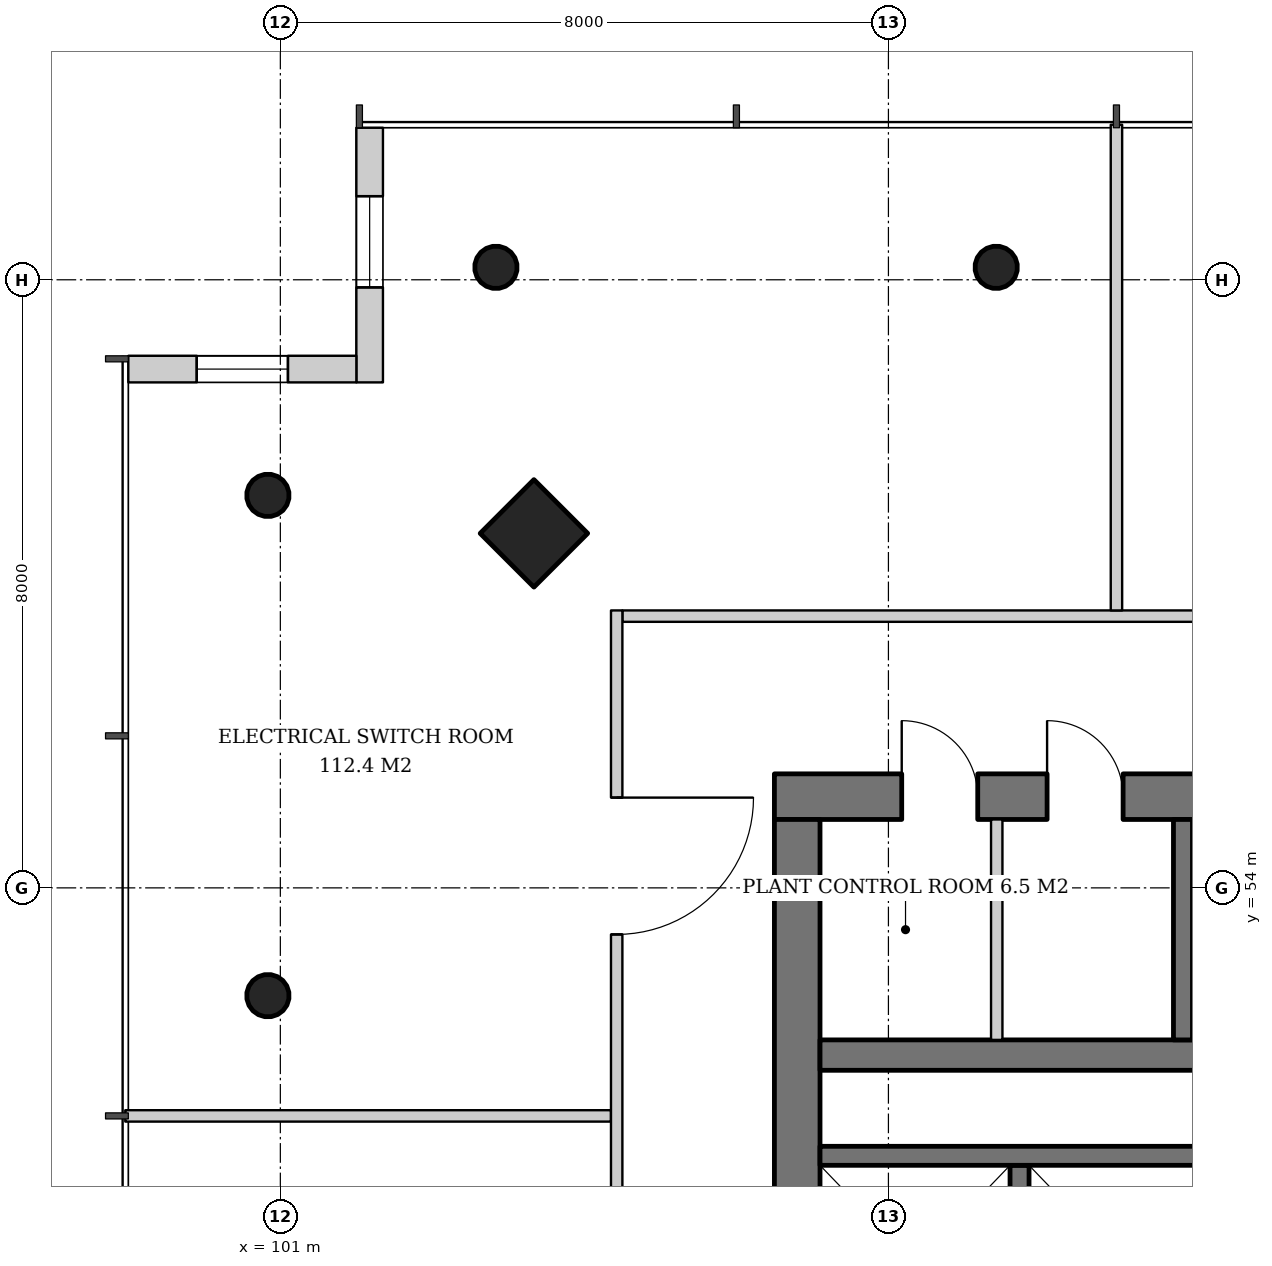
"""IFC4 building model, lengths in metres.
Left out: names, types, materials, properties, quantities, classifications, styles, units other than length and angle.
Written with IfcOpenShell. Run it as: python <this file> out.ifc"""

import sys

from ifc_helpers import new_model, si_unit, direction, frame, frame_2d, origin, origin_2d, place, context, subcontext, project, spatial, rectangle, hollow_circle, extrude, element, fill, save


model = new_model("IFC4")
c1 = context("Model", 3, precision=1e-05, world=origin(), true_north=direction((0.0, 1.0)))
c2 = subcontext(c1, "Body", "Model", "MODEL_VIEW")
j1 = project(units=[si_unit("LENGTHUNIT", "METRE"), si_unit("PLANEANGLEUNIT", "RADIAN")], contexts=[c1])
p1 = place(None, origin())
s1 = spatial("IfcSite", under=j1, at=p1, CompositionType="ELEMENT")
p2 = place(p1, origin())
s2 = spatial("IfcBuilding", under=s1, at=p2, CompositionType="ELEMENT")
p3 = place(p2, frame((0.0, 0.0, 85.6)))
s3 = spatial("IfcBuildingStorey", under=s2, at=p3, CompositionType="ELEMENT", Elevation=85.6)
p4 = place(p3, frame((104.284, 58.716, 0.0), z_axis=(0.043032401563, -0.043032401563, 0.998146494675), x_axis=(0.707106781187, 0.707106781187, 0.0)))
e1 = element("IfcColumn", 1, at=p4, inside=s3, PredefinedType="COLUMN", context=c2, shape_type="SweptSolid", body=[
    extrude(rectangle(XDim=1.0, YDim=1.0, at=origin_2d()), origin(), (0.0, 0.0, 1.0), 3.807),
])
p5 = place(p3, frame((103.784, 62.216, 0.0), z_axis=(0.043032401563, -0.043032401563, 0.998146494675), x_axis=(0.707106781187, 0.707106781187, 0.0)))
e2 = element("IfcColumn", 2, at=p5, inside=s3, PredefinedType="COLUMN", context=c2, shape_type="SweptSolid", body=[
    extrude(hollow_circle(Radius=0.28, WallThickness=0.02, at=origin_2d()), origin(), (0.0, 0.0, 1.0), 3.807),
])
p6 = place(p3, frame((110.392, 62.216, 0.0), z_axis=(0.02149908433, -0.04306234503, 0.998841040313), x_axis=(0.894693706707, 0.446680166538, 0.0)))
e3 = element("IfcColumn", 3, at=p6, inside=s3, PredefinedType="COLUMN", context=c2, shape_type="SweptSolid", body=[
    extrude(hollow_circle(Radius=0.28, WallThickness=0.02, at=origin_2d()), origin(), (0.0, 0.0, 1.0), 3.804),
])
p7 = place(p3, frame((100.784, 59.216, 0.0), z_axis=(0.043032401563, -0.043032401563, 0.998146494675), x_axis=(0.707106781187, 0.707106781187, 0.0)))
e4 = element("IfcColumn", 4, at=p7, inside=s3, PredefinedType="COLUMN", context=c2, shape_type="SweptSolid", body=[
    extrude(hollow_circle(Radius=0.28, WallThickness=0.02, at=origin_2d()), origin(), (0.0, 0.0, 1.0), 3.807),
])
p8 = place(p3, frame((100.784, 52.608, 0.0), z_axis=(0.04306234503, -0.02149908433, 0.998841040313), x_axis=(0.446680166538, 0.894693706707, 0.0)))
e5 = element("IfcColumn", 5, at=p8, inside=s3, PredefinedType="COLUMN", context=c2, shape_type="SweptSolid", body=[
    extrude(hollow_circle(Radius=0.28, WallThickness=0.02, at=origin_2d()), origin(), (0.0, 0.0, 1.0), 3.804),
])
p9 = place(p3, frame((107.5, 55.2, 0.0), z_axis=(0.0, 0.0, 1.0), x_axis=(1.0, 0.0, 0.0)))
e6 = element("IfcWall", 6, at=p9, inside=s3, PredefinedType="SHEAR", context=c2, shape_type="SweptSolid", body=[
    extrude(rectangle(XDim=19.0, YDim=0.6, at=frame_2d((9.5, 0.0))), origin(), (0.0, 0.0, 1.0), 3.8),
])
p10 = place(p9, frame((14.14, 0.0, 0.0)))
e7 = element("IfcOpeningElement", 7, at=p10, cuts=e6, PredefinedType="OPENING", context=c2, shape_type="SweptSolid", body=[
    extrude(rectangle(XDim=1.0, YDim=2.1, at=frame_2d((0.5, 1.05))), frame((0.0, 0.31, 0.0), z_axis=(0.0, -1.0, 0.0), x_axis=(1.0, 0.0, 0.0)), (0.0, 0.0, 1.0), 0.62),
])
p11 = place(p9, frame((1.675, 0.0, 0.0)))
e8 = element("IfcOpeningElement", 8, at=p11, cuts=e6, PredefinedType="OPENING", context=c2, shape_type="SweptSolid", body=[
    extrude(rectangle(XDim=1.0, YDim=2.1, at=frame_2d((0.5, 1.05))), frame((0.0, 0.31, 0.0), z_axis=(0.0, -1.0, 0.0), x_axis=(1.0, 0.0, 0.0)), (0.0, 0.0, 1.0), 0.62),
])
p12 = place(p9, frame((3.587, 0.0, 0.0)))
e9 = element("IfcOpeningElement", 9, at=p12, cuts=e6, PredefinedType="OPENING", context=c2, shape_type="SweptSolid", body=[
    extrude(rectangle(XDim=1.0, YDim=2.1, at=frame_2d((0.5, 1.05))), frame((0.0, 0.31, 0.0), z_axis=(0.0, -1.0, 0.0), x_axis=(1.0, 0.0, 0.0)), (0.0, 0.0, 1.0), 0.62),
])
p13 = place(p3, frame((107.8, 37.1, 0.0), z_axis=(0.0, 0.0, 1.0), x_axis=(0.0, 1.0, 0.0)))
e10 = element("IfcWall", 10, at=p13, inside=s3, PredefinedType="SHEAR", context=c2, shape_type="SweptSolid", body=[
    extrude(rectangle(XDim=17.8, YDim=0.6, at=frame_2d((8.9, 0.0))), origin(), (0.0, 0.0, 1.0), 3.8),
])
p14 = place(p13, frame((8.0, 0.0, 0.0)))
e11 = element("IfcOpeningElement", 11, at=p14, cuts=e10, PredefinedType="OPENING", context=c2, shape_type="SweptSolid", body=[
    extrude(rectangle(XDim=1.8, YDim=2.4, at=frame_2d((0.9, 1.2))), frame((0.0, 0.31, 0.0), z_axis=(0.0, -1.0, 0.0), x_axis=(1.0, 0.0, 0.0)), (0.0, 0.0, 1.0), 0.62),
])
p15 = place(p3, frame((108.1, 51.8, 0.0), z_axis=(0.0, 0.0, 1.0), x_axis=(1.0, 0.0, 0.0)))
e12 = element("IfcWall", 12, at=p15, inside=s3, PredefinedType="SHEAR", context=c2, shape_type="SweptSolid", body=[
    extrude(rectangle(XDim=17.8, YDim=0.4, at=frame_2d((8.9, 0.0))), origin(), (0.0, 0.0, 1.0), 3.8),
])
p16 = place(p15, frame((11.33, 0.0, 0.0)))
e13 = element("IfcOpeningElement", 13, at=p16, cuts=e12, PredefinedType="OPENING", context=c2, shape_type="SweptSolid", body=[
    extrude(rectangle(XDim=1.0, YDim=2.1, at=frame_2d((0.5, 1.05))), frame((0.0, 0.21, 0.0), z_axis=(0.0, -1.0, 0.0), x_axis=(1.0, 0.0, 0.0)), (0.0, 0.0, 1.0), 0.42),
])
p17 = place(p3, frame((102.175, 64.0, 0.0), z_axis=(0.0, 0.0, 1.0), x_axis=(0.0, -1.0, 0.0)))
e14 = element("IfcWall", 14, at=p17, inside=s3, PredefinedType="SOLIDWALL", context=c2, shape_type="SweptSolid", body=[
    extrude(rectangle(XDim=3.35, YDim=0.35, at=frame_2d((1.675, 0.0))), origin(), (0.0, 0.0, 1.0), 3.6),
])
p18 = place(p17, frame((0.9, 0.0, 0.6)))
e15 = element("IfcOpeningElement", 15, at=p18, cuts=e14, PredefinedType="OPENING", context=c2, shape_type="SweptSolid", body=[
    extrude(rectangle(XDim=1.2, YDim=2.55, at=frame_2d((0.6, 1.275))), frame((0.0, 0.185, 0.0), z_axis=(0.0, -1.0, 0.0), x_axis=(1.0, 0.0, 0.0)), (0.0, 0.0, 1.0), 0.37),
])
p19 = place(p3, frame((102.0, 60.825, 0.0), z_axis=(0.0, 0.0, 1.0), x_axis=(-1.0, 0.0, 0.0)))
e16 = element("IfcWall", 16, at=p19, inside=s3, PredefinedType="SOLIDWALL", context=c2, shape_type="SweptSolid", body=[
    extrude(rectangle(XDim=3.0, YDim=0.35, at=frame_2d((1.5, 0.0))), origin(), (0.0, 0.0, 1.0), 3.6),
])
p20 = place(p19, frame((0.9, 0.0, 0.6)))
e17 = element("IfcOpeningElement", 17, at=p20, cuts=e16, PredefinedType="OPENING", context=c2, shape_type="SweptSolid", body=[
    extrude(rectangle(XDim=1.2, YDim=2.55, at=frame_2d((0.6, 1.275))), frame((0.0, 0.185, 0.0), z_axis=(0.0, -1.0, 0.0), x_axis=(1.0, 0.0, 0.0)), (0.0, 0.0, 1.0), 0.37),
])
p21 = place(p3, frame((112.875, 52.0, 0.0), z_axis=(0.0, 0.0, 1.0), x_axis=(0.0, 1.0, 0.0)))
e18 = element("IfcWall", 18, at=p21, inside=s3, PredefinedType="SHEAR", context=c2, shape_type="SweptSolid", body=[
    extrude(rectangle(XDim=2.9, YDim=0.25, at=frame_2d((1.45, 0.0))), origin(), (0.0, 0.0, 1.0), 3.8),
])
p22 = place(p3, frame((110.725, 47.75, 0.0), z_axis=(0.0, 0.0, 1.0), x_axis=(0.0, 1.0, 0.0)))
e19 = element("IfcWall", 19, at=p22, inside=s3, PredefinedType="SHEAR", context=c2, shape_type="SweptSolid", body=[
    extrude(rectangle(XDim=2.6, YDim=0.25, at=frame_2d((1.3, 0.0))), origin(), (0.0, 0.0, 1.0), 3.8),
])
p23 = place(p3, frame((108.1, 50.475, 0.0), z_axis=(0.0, 0.0, 1.0), x_axis=(1.0, 0.0, 0.0)))
e20 = element("IfcWall", 20, at=p23, inside=s3, PredefinedType="SHEAR", context=c2, shape_type="SweptSolid", body=[
    extrude(rectangle(XDim=11.0, YDim=0.25, at=frame_2d((5.5, 0.0))), origin(), (0.0, 0.0, 1.0), 3.8),
])
p24 = place(p3, frame((110.425, 52.0, 0.0), z_axis=(0.0, 0.0, 1.0), x_axis=(0.0, 1.0, 0.0)))
e21 = element("IfcWall", 21, at=p24, inside=s3, PredefinedType="SOLIDWALL", context=c2, shape_type="SweptSolid", body=[
    extrude(rectangle(XDim=2.9, YDim=0.15, at=frame_2d((1.45, 0.0))), origin(), (0.0, 0.0, 1.0), 3.6),
])
p25 = place(p3, frame((128.65, 57.575, 0.0), z_axis=(0.0, 0.0, 1.0), x_axis=(-1.0, 0.0, 0.0)))
e22 = element("IfcWall", 22, at=p25, inside=s3, PredefinedType="SOLIDWALL", context=c2, shape_type="SweptSolid", body=[
    extrude(rectangle(XDim=23.15, YDim=0.15, at=frame_2d((11.575, 0.0))), origin(), (0.0, 0.0, 1.0), 2.9),
])
p26 = place(p25, frame((2.462, 0.0, 0.0)))
e23 = element("IfcOpeningElement", 23, at=p26, cuts=e22, PredefinedType="OPENING", context=c2, shape_type="SweptSolid", body=[
    extrude(rectangle(XDim=1.8, YDim=2.4, at=frame_2d((0.9, 1.2))), frame((0.0, 0.085, 0.0), z_axis=(0.0, -1.0, 0.0), x_axis=(1.0, 0.0, 0.0)), (0.0, 0.0, 1.0), 0.17),
])
p27 = place(p25, frame((10.75, 0.0, 0.0)))
e24 = element("IfcOpeningElement", 24, at=p27, cuts=e22, PredefinedType="OPENING", context=c2, shape_type="SweptSolid", body=[
    extrude(rectangle(XDim=1.8, YDim=2.4, at=frame_2d((0.9, 1.2))), frame((0.0, 0.085, 0.0), z_axis=(0.0, -1.0, 0.0), x_axis=(1.0, 0.0, 0.0)), (0.0, 0.0, 1.0), 0.17),
])
p28 = place(p3, frame((112.0, 57.65, 0.0), z_axis=(0.0, 0.0, 1.0), x_axis=(0.0, 1.0, 0.0)))
e25 = element("IfcWall", 25, at=p28, inside=s3, PredefinedType="SOLIDWALL", context=c2, shape_type="SweptSolid", body=[
    extrude(rectangle(XDim=6.39, YDim=0.15, at=frame_2d((3.195, 0.0))), origin(), (0.0, 0.0, 1.0), 3.2),
])
p29 = place(p3, frame((105.35, 51.0, 0.0), z_axis=(0.0, 0.0, 1.0), x_axis=(-1.0, 0.0, 0.0)))
e26 = element("IfcWall", 26, at=p29, inside=s3, PredefinedType="SOLIDWALL", context=c2, shape_type="SweptSolid", body=[
    extrude(rectangle(XDim=6.39, YDim=0.15, at=frame_2d((3.195, 0.0))), origin(), (0.0, 0.0, 1.0), 3.0),
])
p30 = place(p3, frame((105.425, 57.65, 0.0), z_axis=(0.0, 0.0, 1.0), x_axis=(0.0, -1.0, 0.0)))
e27 = element("IfcWall", 27, at=p30, inside=s3, PredefinedType="SOLIDWALL", context=c2, shape_type="SweptSolid", body=[
    extrude(rectangle(XDim=23.15, YDim=0.15, at=frame_2d((11.575, 0.0))), origin(), (0.0, 0.0, 1.0), 2.9),
])
p31 = place(p30, frame((2.462, 0.0, 0.0)))
e28 = element("IfcOpeningElement", 28, at=p31, cuts=e27, PredefinedType="OPENING", context=c2, shape_type="SweptSolid", body=[
    extrude(rectangle(XDim=1.8, YDim=2.4, at=frame_2d((0.9, 1.2))), frame((0.0, 0.085, 0.0), z_axis=(0.0, -1.0, 0.0), x_axis=(1.0, 0.0, 0.0)), (0.0, 0.0, 1.0), 0.17),
])
p32 = place(p30, frame((10.75, 0.0, 0.0)))
e29 = element("IfcOpeningElement", 29, at=p32, cuts=e27, PredefinedType="OPENING", context=c2, shape_type="SweptSolid", body=[
    extrude(rectangle(XDim=1.8, YDim=2.4, at=frame_2d((0.9, 1.2))), frame((0.0, 0.085, 0.0), z_axis=(0.0, -1.0, 0.0), x_axis=(1.0, 0.0, 0.0)), (0.0, 0.0, 1.0), 0.17),
])
p33 = place(p18, origin())
e30 = element("IfcWindow", 30, at=p33, inside=s3, PartitioningType="SINGLE_PANEL", PredefinedType="USERDEFINED", context=c2, shape_type="SweptSolid", body=[
    extrude(rectangle(XDim=1.2, YDim=2.55, at=frame_2d((0.6, 1.275))), frame((0.0, 0.03, 0.0), z_axis=(0.0, -1.0, 0.0), x_axis=(1.0, 0.0, 0.0)), (0.0, 0.0, 1.0), 0.06),
])
fill(e15, e30)
p34 = place(p20, origin())
e31 = element("IfcWindow", 31, at=p34, inside=s3, PartitioningType="SINGLE_PANEL", PredefinedType="USERDEFINED", context=c2, shape_type="SweptSolid", body=[
    extrude(rectangle(XDim=1.2, YDim=2.55, at=frame_2d((0.6, 1.275))), frame((0.0, 0.03, 0.0), z_axis=(0.0, -1.0, 0.0), x_axis=(1.0, 0.0, 0.0)), (0.0, 0.0, 1.0), 0.06),
])
fill(e17, e31)
p35 = place(p11, origin())
e32 = element("IfcDoor", 32, at=p35, inside=s3, OperationType="SINGLE_SWING_LEFT", PredefinedType="DOOR", context=c2, shape_type="SweptSolid", body=[
    extrude(rectangle(XDim=1.0, YDim=2.1, at=frame_2d((0.5, 1.05))), frame((0.0, -0.24, 0.0), z_axis=(0.0, -1.0, 0.0), x_axis=(1.0, 0.0, 0.0)), (0.0, 0.0, 1.0), 0.05),
])
fill(e8, e32)
p36 = place(p12, origin())
e33 = element("IfcDoor", 33, at=p36, inside=s3, OperationType="SINGLE_SWING_LEFT", PredefinedType="DOOR", context=c2, shape_type="SweptSolid", body=[
    extrude(rectangle(XDim=1.0, YDim=2.1, at=frame_2d((0.5, 1.05))), frame((0.0, -0.24, 0.0), z_axis=(0.0, -1.0, 0.0), x_axis=(1.0, 0.0, 0.0)), (0.0, 0.0, 1.0), 0.05),
])
fill(e9, e33)
p37 = place(p31, origin())
e34 = element("IfcDoor", 34, at=p37, inside=s3, OperationType="DOUBLE_DOOR_SINGLE_SWING", PredefinedType="DOOR", context=c2, shape_type="SweptSolid", body=[
    extrude(rectangle(XDim=1.8, YDim=2.4, at=frame_2d((0.9, 1.2))), frame((0.0, 0.025, 0.0), z_axis=(0.0, -1.0, 0.0), x_axis=(1.0, 0.0, 0.0)), (0.0, 0.0, 1.0), 0.05),
])
fill(e28, e34)
save(model, sys.argv[1])
